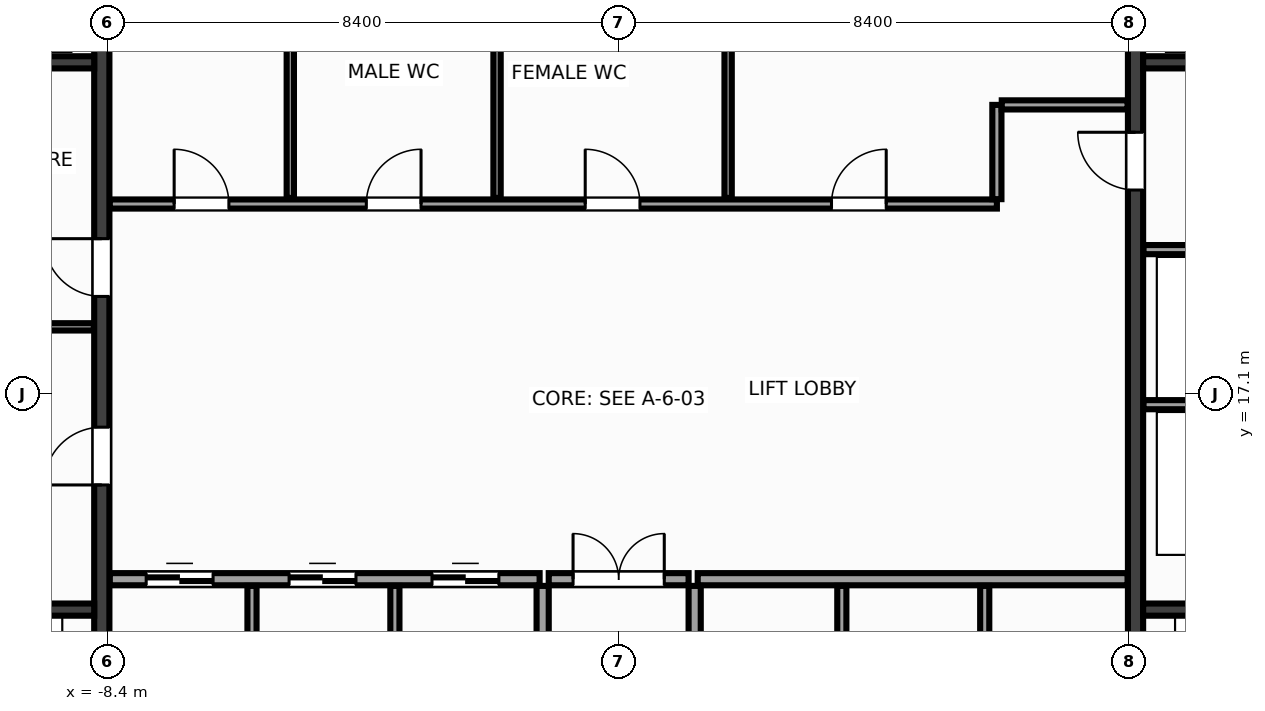
"""IFC4 building model, lengths in metres.
Left out: names, types, materials, properties, quantities, classifications, styles, units other than length and angle.
Written with IfcOpenShell. Run it as: python <this file> out.ifc"""

import sys

from ifc_helpers import new_model, si_unit, direction, frame, frame_2d, origin, place, context, subcontext, project, spatial, rectangle, extrude, source, transform, mapped, element, fill, save


model = new_model("IFC4")
c1 = context("Model", 3, precision=1e-05, world=origin(), true_north=direction((0.0, 1.0)))
c2 = subcontext(c1, "Body", "Model", "MODEL_VIEW")
j1 = project(units=[si_unit("LENGTHUNIT", "METRE"), si_unit("PLANEANGLEUNIT", "RADIAN")], contexts=[c1])
p1 = place(None, origin())
s1 = spatial("IfcSite", under=j1, at=p1, CompositionType="ELEMENT")
p2 = place(p1, origin())
s2 = spatial("IfcBuilding", under=s1, at=p2, CompositionType="ELEMENT")
p3 = place(p2, frame((0.0, 0.0, 34.4)))
s3 = spatial("IfcBuildingStorey", under=s2, at=p3, CompositionType="ELEMENT", Elevation=34.4)
m1 = source(origin(), c2, "Body", "SweptSolid", [
    extrude(rectangle(XDim=12.8, YDim=0.25, at=frame_2d((6.4, 0.0))), origin(), (0.0, 0.0, 1.0), 3.6),
])
p4 = place(p3, frame((-8.5, 10.6, 0.0), z_axis=(0.0, 0.0, 1.0), x_axis=(0.0, 1.0, 0.0)))
e1 = element("IfcWall", 1, at=p4, inside=s3, PredefinedType="SHEAR", context=c2, shape_type="MappedRepresentation", body=[
    mapped(m1, transform((0.0, 0.0, 0.0), x_axis=(1.0, 0.0, 0.0), y_axis=(0.0, 1.0, 0.0), z_axis=(0.0, 0.0, 1.0), scale=1.0)),
])
p5 = place(p4, frame((5.0, 0.0, 0.0)))
e2 = element("IfcOpeningElement", 2, at=p5, cuts=e1, PredefinedType="OPENING", context=c2, shape_type="SweptSolid", body=[
    extrude(rectangle(XDim=0.95, YDim=2.15, at=frame_2d((0.475, 1.075))), frame((0.0, 0.137, 0.0), z_axis=(0.0, -1.0, 0.0), x_axis=(1.0, 0.0, 0.0)), (0.0, 0.0, 1.0), 0.274),
])
p6 = place(p4, frame((8.1, 0.0, 0.0)))
e3 = element("IfcOpeningElement", 3, at=p6, cuts=e1, PredefinedType="OPENING", context=c2, shape_type="SweptSolid", body=[
    extrude(rectangle(XDim=0.95, YDim=2.15, at=frame_2d((0.475, 1.075))), frame((0.0, 0.137, 0.0), z_axis=(0.0, -1.0, 0.0), x_axis=(1.0, 0.0, 0.0)), (0.0, 0.0, 1.0), 0.274),
])
p7 = place(p3, frame((8.5, 10.6, 0.0), z_axis=(0.0, 0.0, 1.0), x_axis=(0.0, 1.0, 0.0)))
e4 = element("IfcWall", 4, at=p7, inside=s3, PredefinedType="SHEAR", context=c2, shape_type="MappedRepresentation", body=[
    mapped(m1, transform((0.0, 0.0, 0.0), x_axis=(1.0, 0.0, 0.0), y_axis=(0.0, 1.0, 0.0), z_axis=(0.0, 0.0, 1.0), scale=1.0)),
])
p8 = place(p7, frame((9.85, 0.0, 0.0)))
e5 = element("IfcOpeningElement", 5, at=p8, cuts=e4, PredefinedType="OPENING", context=c2, shape_type="SweptSolid", body=[
    extrude(rectangle(XDim=0.95, YDim=2.15, at=frame_2d((0.475, 1.075))), frame((0.0, 0.137, 0.0), z_axis=(0.0, -1.0, 0.0), x_axis=(1.0, 0.0, 0.0)), (0.0, 0.0, 1.0), 0.274),
])
m2 = source(origin(), c2, "Body", "SweptSolid", [
    extrude(rectangle(XDim=2.825, YDim=0.2, at=frame_2d((1.413, 0.0))), origin(), (0.0, 0.0, 1.0), 3.6),
])
for number, where, z_axis, x_axis in (
    (6, (-11.45, 13.55, 0.0), (0.0, 0.0, 1.0), (1.0, 0.0, 0.0)),
    (7, (8.625, 13.55, 0.0), (0.0, 0.0, 1.0), (1.0, 0.0, 0.0)),
):
    element("IfcWall", number, at=place(p3, frame(where, z_axis=z_axis, x_axis=x_axis)), inside=s3, PredefinedType="SHEAR", context=c2, shape_type="MappedRepresentation", body=[
        mapped(m2, transform((0.0, 0.0, 0.0), x_axis=(1.0, 0.0, 0.0), y_axis=(0.0, 1.0, 0.0), z_axis=(0.0, 0.0, 1.0), scale=1.0)),
    ])
m3 = source(origin(), c2, "Body", "SweptSolid", [
    extrude(rectangle(XDim=3.02, YDim=0.2, at=frame_2d((1.51, 0.0))), origin(), (0.0, 0.0, 1.0), 3.6),
])
for number, where, z_axis, x_axis in (
    (8, (-11.645, 22.55, 0.0), (0.0, 0.0, 1.0), (1.0, 0.0, 0.0)),
    (9, (8.625, 22.55, 0.0), (0.0, 0.0, 1.0), (1.0, 0.0, 0.0)),
):
    element("IfcWall", number, at=place(p3, frame(where, z_axis=z_axis, x_axis=x_axis)), inside=s3, PredefinedType="SHEAR", context=c2, shape_type="MappedRepresentation", body=[
        mapped(m3, transform((0.0, 0.0, 0.0), x_axis=(1.0, 0.0, 0.0), y_axis=(0.0, 1.0, 0.0), z_axis=(0.0, 0.0, 1.0), scale=1.0)),
    ])
m4 = source(origin(), c2, "Body", "SweptSolid", [
    extrude(rectangle(XDim=3.01, YDim=0.12, at=frame_2d((1.505, 0.0))), origin(), (0.0, 0.0, 1.0), 3.36),
])
p9 = place(p3, frame((-11.64, 18.2, 0.0), z_axis=(0.0, 0.0, 1.0), x_axis=(1.0, 0.0, 0.0)))
e10 = element("IfcWall", 10, at=p9, inside=s3, PredefinedType="PARTITIONING", context=c2, shape_type="MappedRepresentation", body=[
    mapped(m4, transform((0.0, 0.0, 0.0), x_axis=(1.0, 0.0, 0.0), y_axis=(0.0, 1.0, 0.0), z_axis=(0.0, 0.0, 1.0), scale=1.0)),
])
m5 = source(origin(), c2, "Body", "SweptSolid", [
    extrude(rectangle(XDim=3.01, YDim=0.15, at=frame_2d((1.505, 0.0))), origin(), (0.0, 0.0, 1.0), 3.36),
])
for number, where, z_axis, x_axis in (
    (11, (8.63, 16.92, 0.0), (0.0, 0.0, 1.0), (1.0, 0.0, 0.0)),
    (12, (8.63, 19.47, 0.0), (0.0, 0.0, 1.0), (1.0, 0.0, 0.0)),
):
    element("IfcWall", number, at=place(p3, frame(where, z_axis=z_axis, x_axis=x_axis)), inside=s3, PredefinedType="PARTITIONING", context=c2, shape_type="MappedRepresentation", body=[
        mapped(m5, transform((0.0, 0.0, 0.0), x_axis=(1.0, 0.0, 0.0), y_axis=(0.0, 1.0, 0.0), z_axis=(0.0, 0.0, 1.0), scale=1.0)),
    ])
m6 = source(origin(), c2, "Body", "SweptSolid", [
    extrude(rectangle(XDim=7.07, YDim=0.2, at=frame_2d((3.535, 0.0))), origin(), (0.0, 0.0, 1.0), 3.36),
])
p10 = place(p3, frame((-8.37, 14.05, 0.0), z_axis=(0.0, 0.0, 1.0), x_axis=(1.0, 0.0, 0.0)))
e13 = element("IfcWall", 13, at=p10, inside=s3, PredefinedType="PARTITIONING", context=c2, shape_type="MappedRepresentation", body=[
    mapped(m6, transform((0.0, 0.0, 0.0), x_axis=(1.0, 0.0, 0.0), y_axis=(0.0, 1.0, 0.0), z_axis=(0.0, 0.0, 1.0), scale=1.0)),
])
p11 = place(p10, frame((0.6, 0.0, 0.0)))
e14 = element("IfcOpeningElement", 14, at=p11, cuts=e13, PredefinedType="OPENING", context=c2, shape_type="SweptSolid", body=[
    extrude(rectangle(XDim=1.1, YDim=2.15, at=frame_2d((0.55, 1.075))), frame((0.0, 0.112, 0.0), z_axis=(0.0, -1.0, 0.0), x_axis=(1.0, 0.0, 0.0)), (0.0, 0.0, 1.0), 0.224),
])
p12 = place(p10, frame((2.95, 0.0, 0.0)))
e15 = element("IfcOpeningElement", 15, at=p12, cuts=e13, PredefinedType="OPENING", context=c2, shape_type="SweptSolid", body=[
    extrude(rectangle(XDim=1.1, YDim=2.15, at=frame_2d((0.55, 1.075))), frame((0.0, 0.112, 0.0), z_axis=(0.0, -1.0, 0.0), x_axis=(1.0, 0.0, 0.0)), (0.0, 0.0, 1.0), 0.224),
])
p13 = place(p10, frame((5.3, 0.0, 0.0)))
e16 = element("IfcOpeningElement", 16, at=p13, cuts=e13, PredefinedType="OPENING", context=c2, shape_type="SweptSolid", body=[
    extrude(rectangle(XDim=1.1, YDim=2.15, at=frame_2d((0.55, 1.075))), frame((0.0, 0.112, 0.0), z_axis=(0.0, -1.0, 0.0), x_axis=(1.0, 0.0, 0.0)), (0.0, 0.0, 1.0), 0.224),
])
p14 = place(p3, frame((1.3, 14.05, 0.0), z_axis=(0.0, 0.0, 1.0), x_axis=(1.0, 0.0, 0.0)))
e17 = element("IfcWall", 17, at=p14, inside=s3, PredefinedType="PARTITIONING", context=c2, shape_type="MappedRepresentation", body=[
    mapped(m6, transform((0.0, 0.0, 0.0), x_axis=(1.0, 0.0, 0.0), y_axis=(0.0, 1.0, 0.0), z_axis=(0.0, 0.0, 1.0), scale=1.0)),
])
m7 = source(origin(), c2, "Body", "SweptSolid", [
    extrude(rectangle(XDim=3.34, YDim=0.2, at=frame_2d((1.67, 0.0))), origin(), (0.0, 0.0, 1.0), 3.36),
])
for number, where, z_axis, x_axis in (
    (18, (-1.25, 10.6, 0.0), (0.0, 0.0, 1.0), (0.0, 1.0, 0.0)),
    (19, (1.25, 10.6, 0.0), (0.0, 0.0, 1.0), (0.0, 1.0, 0.0)),
):
    element("IfcWall", number, at=place(p3, frame(where, z_axis=z_axis, x_axis=x_axis)), inside=s3, PredefinedType="PARTITIONING", context=c2, shape_type="MappedRepresentation", body=[
        mapped(m7, transform((0.0, 0.0, 0.0), x_axis=(1.0, 0.0, 0.0), y_axis=(0.0, 1.0, 0.0), z_axis=(0.0, 0.0, 1.0), scale=1.0)),
    ])
m8 = source(origin(), c2, "Body", "SweptSolid", [
    extrude(rectangle(XDim=2.3, YDim=0.2, at=frame_2d((1.15, 0.0))), origin(), (0.0, 0.0, 1.0), 3.36),
])
p15 = place(p3, frame((-1.15, 14.05, 0.0), z_axis=(0.0, 0.0, 1.0), x_axis=(1.0, 0.0, 0.0)))
e20 = element("IfcWall", 20, at=p15, inside=s3, PredefinedType="PARTITIONING", context=c2, shape_type="MappedRepresentation", body=[
    mapped(m8, transform((0.0, 0.0, 0.0), x_axis=(1.0, 0.0, 0.0), y_axis=(0.0, 1.0, 0.0), z_axis=(0.0, 0.0, 1.0), scale=1.0)),
])
p16 = place(p15, frame((0.4, 0.0, 0.0)))
e21 = element("IfcOpeningElement", 21, at=p16, cuts=e20, PredefinedType="OPENING", context=c2, shape_type="SweptSolid", body=[
    extrude(rectangle(XDim=1.5, YDim=2.2, at=frame_2d((0.75, 1.1))), frame((0.0, 0.112, 0.0), z_axis=(0.0, -1.0, 0.0), x_axis=(1.0, 0.0, 0.0)), (0.0, 0.0, 1.0), 0.224),
])
m9 = source(origin(), c2, "Body", "SweptSolid", [
    extrude(rectangle(XDim=14.59, YDim=0.15, at=frame_2d((7.295, 0.0))), origin(), (0.0, 0.0, 1.0), 3.36),
])
p17 = place(p3, frame((-8.37, 20.22, 0.0), z_axis=(0.0, 0.0, 1.0), x_axis=(1.0, 0.0, 0.0)))
e22 = element("IfcWall", 22, at=p17, inside=s3, PredefinedType="PARTITIONING", context=c2, shape_type="MappedRepresentation", body=[
    mapped(m9, transform((0.0, 0.0, 0.0), x_axis=(1.0, 0.0, 0.0), y_axis=(0.0, 1.0, 0.0), z_axis=(0.0, 0.0, 1.0), scale=1.0)),
])
p18 = place(p17, frame((1.06, 0.0, 0.0)))
e23 = element("IfcOpeningElement", 23, at=p18, cuts=e22, PredefinedType="OPENING", context=c2, shape_type="SweptSolid", body=[
    extrude(rectangle(XDim=0.9, YDim=2.15, at=frame_2d((0.45, 1.075))), frame((0.0, 0.087, 0.0), z_axis=(0.0, -1.0, 0.0), x_axis=(1.0, 0.0, 0.0)), (0.0, 0.0, 1.0), 0.174),
])
p19 = place(p17, frame((4.22, 0.0, 0.0)))
e24 = element("IfcOpeningElement", 24, at=p19, cuts=e22, PredefinedType="OPENING", context=c2, shape_type="SweptSolid", body=[
    extrude(rectangle(XDim=0.9, YDim=2.15, at=frame_2d((0.45, 1.075))), frame((0.0, 0.087, 0.0), z_axis=(0.0, -1.0, 0.0), x_axis=(1.0, 0.0, 0.0)), (0.0, 0.0, 1.0), 0.174),
])
p20 = place(p17, frame((7.82, 0.0, 0.0)))
e25 = element("IfcOpeningElement", 25, at=p20, cuts=e22, PredefinedType="OPENING", context=c2, shape_type="SweptSolid", body=[
    extrude(rectangle(XDim=0.9, YDim=2.15, at=frame_2d((0.45, 1.075))), frame((0.0, 0.087, 0.0), z_axis=(0.0, -1.0, 0.0), x_axis=(1.0, 0.0, 0.0)), (0.0, 0.0, 1.0), 0.174),
])
p21 = place(p17, frame((11.87, 0.0, 0.0)))
e26 = element("IfcOpeningElement", 26, at=p21, cuts=e22, PredefinedType="OPENING", context=c2, shape_type="SweptSolid", body=[
    extrude(rectangle(XDim=0.9, YDim=2.15, at=frame_2d((0.45, 1.075))), frame((0.0, 0.087, 0.0), z_axis=(0.0, -1.0, 0.0), x_axis=(1.0, 0.0, 0.0)), (0.0, 0.0, 1.0), 0.174),
])
m10 = source(origin(), c2, "Body", "SweptSolid", [
    extrude(rectangle(XDim=1.55, YDim=0.15, at=frame_2d((0.775, 0.0))), origin(), (0.0, 0.0, 1.0), 3.36),
])
p22 = place(p3, frame((6.22, 20.3, 0.0), z_axis=(0.0, 0.0, 1.0), x_axis=(0.0, 1.0, 0.0)))
e27 = element("IfcWall", 27, at=p22, inside=s3, PredefinedType="PARTITIONING", context=c2, shape_type="MappedRepresentation", body=[
    mapped(m10, transform((0.0, 0.0, 0.0), x_axis=(1.0, 0.0, 0.0), y_axis=(0.0, 1.0, 0.0), z_axis=(0.0, 0.0, 1.0), scale=1.0)),
])
m11 = source(origin(), c2, "Body", "SweptSolid", [
    extrude(rectangle(XDim=2.07, YDim=0.15, at=frame_2d((1.035, 0.0))), origin(), (0.0, 0.0, 1.0), 3.36),
])
p23 = place(p3, frame((6.3, 21.85, 0.0), z_axis=(0.0, 0.0, 1.0), x_axis=(1.0, 0.0, 0.0)))
e28 = element("IfcWall", 28, at=p23, inside=s3, PredefinedType="PARTITIONING", context=c2, shape_type="MappedRepresentation", body=[
    mapped(m11, transform((0.0, 0.0, 0.0), x_axis=(1.0, 0.0, 0.0), y_axis=(0.0, 1.0, 0.0), z_axis=(0.0, 0.0, 1.0), scale=1.0)),
])
m12 = source(origin(), c2, "Body", "SweptSolid", [
    extrude(rectangle(XDim=3.34, YDim=0.15, at=frame_2d((1.67, 0.0))), origin(), (0.0, 0.0, 1.0), 3.36),
])
for number, where, z_axis, x_axis in (
    (29, (-6.03, 10.6, 0.0), (0.0, 0.0, 1.0), (0.0, 1.0, 0.0)),
    (30, (-3.68, 10.6, 0.0), (0.0, 0.0, 1.0), (0.0, 1.0, 0.0)),
    (31, (3.67, 10.6, 0.0), (0.0, 0.0, 1.0), (0.0, 1.0, 0.0)),
    (32, (6.02, 10.6, 0.0), (0.0, 0.0, 1.0), (0.0, 1.0, 0.0)),
):
    element("IfcWall", number, at=place(p3, frame(where, z_axis=z_axis, x_axis=x_axis)), inside=s3, PredefinedType="PARTITIONING", context=c2, shape_type="MappedRepresentation", body=[
        mapped(m12, transform((0.0, 0.0, 0.0), x_axis=(1.0, 0.0, 0.0), y_axis=(0.0, 1.0, 0.0), z_axis=(0.0, 0.0, 1.0), scale=1.0)),
    ])
m13 = source(origin(), c2, "Body", "SweptSolid", [
    extrude(rectangle(XDim=3.04, YDim=0.12, at=frame_2d((1.52, 0.0))), origin(), (0.0, 0.0, 1.0), 3.36),
])
for number, where, z_axis, x_axis in (
    (33, (-5.4, 20.32, 0.0), (0.0, 0.0, 1.0), (0.0, 1.0, 0.0)),
    (34, (-2.0, 20.32, 0.0), (0.0, 0.0, 1.0), (0.0, 1.0, 0.0)),
    (35, (1.8, 20.32, 0.0), (0.0, 0.0, 1.0), (0.0, 1.0, 0.0)),
):
    element("IfcWall", number, at=place(p3, frame(where, z_axis=z_axis, x_axis=x_axis)), inside=s3, PredefinedType="PARTITIONING", context=c2, shape_type="MappedRepresentation", body=[
        mapped(m13, transform((0.0, 0.0, 0.0), x_axis=(1.0, 0.0, 0.0), y_axis=(0.0, 1.0, 0.0), z_axis=(0.0, 0.0, 1.0), scale=1.0)),
    ])
m14 = source(origin(), c2, "Body", "SweptSolid", [
    extrude(rectangle(XDim=0.95, YDim=2.15, at=frame_2d((0.475, 1.075))), frame((0.0, 0.025, 0.0), z_axis=(0.0, -1.0, 0.0), x_axis=(1.0, 0.0, 0.0)), (0.0, 0.0, 1.0), 0.05),
])
p24 = place(p5, origin())
e36 = element("IfcDoor", 36, at=p24, inside=s3, OperationType="SINGLE_SWING_LEFT", PredefinedType="DOOR", context=c2, shape_type="MappedRepresentation", body=[
    mapped(m14, transform((0.0, 0.0, 0.0), x_axis=(1.0, 0.0, 0.0), y_axis=(0.0, 1.0, 0.0), z_axis=(0.0, 0.0, 1.0), scale=1.0)),
])
fill(e2, e36)
p25 = place(p6, origin())
e37 = element("IfcDoor", 37, at=p25, inside=s3, OperationType="SINGLE_SWING_RIGHT", PredefinedType="DOOR", context=c2, shape_type="MappedRepresentation", body=[
    mapped(m14, transform((0.0, 0.0, 0.0), x_axis=(1.0, 0.0, 0.0), y_axis=(0.0, 1.0, 0.0), z_axis=(0.0, 0.0, 1.0), scale=1.0)),
])
fill(e3, e37)
m15 = source(origin(), c2, "Body", "SweptSolid", [
    extrude(rectangle(XDim=0.95, YDim=2.15, at=frame_2d((0.475, 1.075))), frame((0.0, 0.025, 0.0), z_axis=(0.0, -1.0, 0.0), x_axis=(1.0, 0.0, 0.0)), (0.0, 0.0, 1.0), 0.05),
])
p26 = place(p8, origin())
e38 = element("IfcDoor", 38, at=p26, inside=s3, OperationType="SINGLE_SWING_RIGHT", PredefinedType="DOOR", context=c2, shape_type="MappedRepresentation", body=[
    mapped(m15, transform((0.0, 0.0, 0.0), x_axis=(1.0, 0.0, 0.0), y_axis=(0.0, 1.0, 0.0), z_axis=(0.0, 0.0, 1.0), scale=1.0)),
])
fill(e5, e38)
m16 = source(origin(), c2, "Body", "SweptSolid", [
    extrude(rectangle(XDim=1.1, YDim=2.15, at=frame_2d((0.55, 1.075))), frame((0.0, 0.025, 0.0), z_axis=(0.0, -1.0, 0.0), x_axis=(1.0, 0.0, 0.0)), (0.0, 0.0, 1.0), 0.05),
])
p27 = place(p11, origin())
e39 = element("IfcDoor", 39, at=p27, inside=s3, OperationType="DOUBLE_DOOR_SLIDING", PredefinedType="DOOR", context=c2, shape_type="MappedRepresentation", body=[
    mapped(m16, transform((0.0, 0.0, 0.0), x_axis=(1.0, 0.0, 0.0), y_axis=(0.0, 1.0, 0.0), z_axis=(0.0, 0.0, 1.0), scale=1.0)),
])
fill(e14, e39)
p28 = place(p12, origin())
e40 = element("IfcDoor", 40, at=p28, inside=s3, OperationType="DOUBLE_DOOR_SLIDING", PredefinedType="DOOR", context=c2, shape_type="MappedRepresentation", body=[
    mapped(m16, transform((0.0, 0.0, 0.0), x_axis=(1.0, 0.0, 0.0), y_axis=(0.0, 1.0, 0.0), z_axis=(0.0, 0.0, 1.0), scale=1.0)),
])
fill(e15, e40)
p29 = place(p13, origin())
e41 = element("IfcDoor", 41, at=p29, inside=s3, OperationType="DOUBLE_DOOR_SLIDING", PredefinedType="DOOR", context=c2, shape_type="MappedRepresentation", body=[
    mapped(m16, transform((0.0, 0.0, 0.0), x_axis=(1.0, 0.0, 0.0), y_axis=(0.0, 1.0, 0.0), z_axis=(0.0, 0.0, 1.0), scale=1.0)),
])
fill(e16, e41)
m17 = source(origin(), c2, "Body", "SweptSolid", [
    extrude(rectangle(XDim=1.5, YDim=2.2, at=frame_2d((0.75, 1.1))), frame((0.0, 0.025, 0.0), z_axis=(0.0, -1.0, 0.0), x_axis=(1.0, 0.0, 0.0)), (0.0, 0.0, 1.0), 0.05),
])
p30 = place(p16, origin())
e42 = element("IfcDoor", 42, at=p30, inside=s3, OperationType="DOUBLE_DOOR_SINGLE_SWING", PredefinedType="DOOR", context=c2, shape_type="MappedRepresentation", body=[
    mapped(m17, transform((0.0, 0.0, 0.0), x_axis=(1.0, 0.0, 0.0), y_axis=(0.0, 1.0, 0.0), z_axis=(0.0, 0.0, 1.0), scale=1.0)),
])
fill(e21, e42)
m18 = source(origin(), c2, "Body", "SweptSolid", [
    extrude(rectangle(XDim=0.9, YDim=2.15, at=frame_2d((0.45, 1.075))), frame((0.0, 0.025, 0.0), z_axis=(0.0, -1.0, 0.0), x_axis=(1.0, 0.0, 0.0)), (0.0, 0.0, 1.0), 0.05),
])
p31 = place(p18, origin())
e43 = element("IfcDoor", 43, at=p31, inside=s3, OperationType="SINGLE_SWING_LEFT", PredefinedType="DOOR", context=c2, shape_type="MappedRepresentation", body=[
    mapped(m18, transform((0.0, 0.0, 0.0), x_axis=(1.0, 0.0, 0.0), y_axis=(0.0, 1.0, 0.0), z_axis=(0.0, 0.0, 1.0), scale=1.0)),
])
fill(e23, e43)
p32 = place(p19, origin())
e44 = element("IfcDoor", 44, at=p32, inside=s3, OperationType="SINGLE_SWING_RIGHT", PredefinedType="DOOR", context=c2, shape_type="MappedRepresentation", body=[
    mapped(m18, transform((0.0, 0.0, 0.0), x_axis=(1.0, 0.0, 0.0), y_axis=(0.0, 1.0, 0.0), z_axis=(0.0, 0.0, 1.0), scale=1.0)),
])
fill(e24, e44)
p33 = place(p20, origin())
e45 = element("IfcDoor", 45, at=p33, inside=s3, OperationType="SINGLE_SWING_LEFT", PredefinedType="DOOR", context=c2, shape_type="MappedRepresentation", body=[
    mapped(m18, transform((0.0, 0.0, 0.0), x_axis=(1.0, 0.0, 0.0), y_axis=(0.0, 1.0, 0.0), z_axis=(0.0, 0.0, 1.0), scale=1.0)),
])
fill(e25, e45)
p34 = place(p21, origin())
e46 = element("IfcDoor", 46, at=p34, inside=s3, OperationType="SINGLE_SWING_RIGHT", PredefinedType="DOOR", context=c2, shape_type="MappedRepresentation", body=[
    mapped(m18, transform((0.0, 0.0, 0.0), x_axis=(1.0, 0.0, 0.0), y_axis=(0.0, 1.0, 0.0), z_axis=(0.0, 0.0, 1.0), scale=1.0)),
])
fill(e26, e46)
save(model, sys.argv[1])
